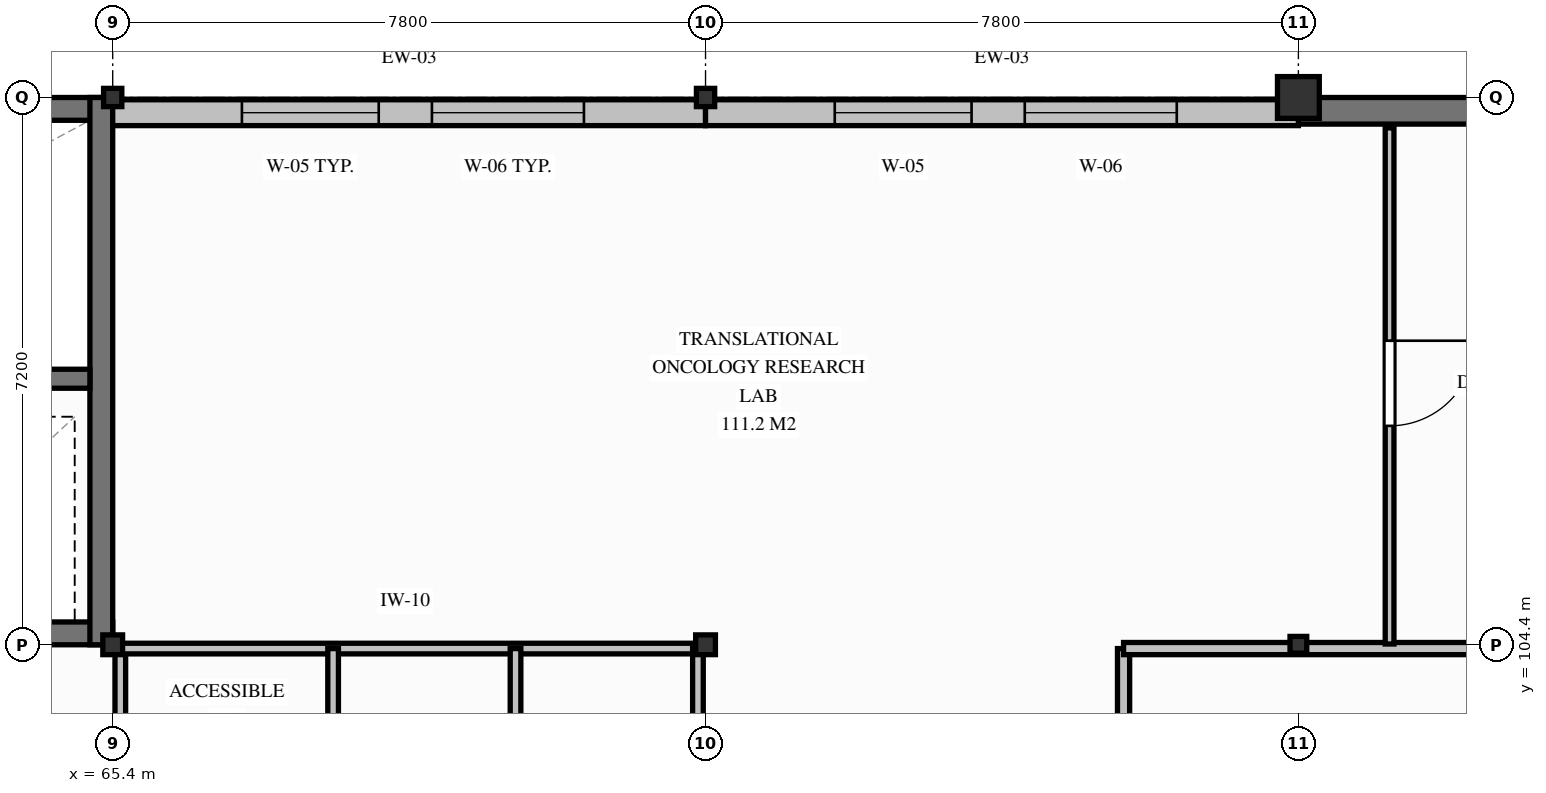
"""IFC4 building model, lengths in metres.
Left out: names, types, materials, properties, quantities, classifications, styles, units other than length and angle.
Written with IfcOpenShell. Run it as: python <this file> out.ifc"""

import sys

from ifc_helpers import new_model, si_unit, direction, frame, frame_2d, origin, origin_2d, place, context, subcontext, project, spatial, rectangle, hollow_rectangle, i_section, extrude, element, fill, save


model = new_model("IFC4")
c1 = context("Model", 3, precision=1e-05, world=origin(), true_north=direction((0.0, 1.0)))
c2 = subcontext(c1, "Body", "Model", "MODEL_VIEW")
j1 = project(units=[si_unit("LENGTHUNIT", "METRE"), si_unit("PLANEANGLEUNIT", "RADIAN")], contexts=[c1])
p1 = place(None, origin())
s1 = spatial("IfcSite", under=j1, at=p1, CompositionType="ELEMENT")
p2 = place(p1, origin())
s2 = spatial("IfcBuilding", under=s1, at=p2, CompositionType="ELEMENT")
p3 = place(p2, frame((0.0, 0.0, 25.35)))
s3 = spatial("IfcBuildingStorey", under=s2, at=p3, CompositionType="ELEMENT", Elevation=25.35)
p4 = place(p3, frame((57.0, 111.45, 0.0), z_axis=(0.0, 0.0, 1.0), x_axis=(1.0, 0.0, 0.0)))
e1 = element("IfcWall", 1, at=p4, inside=s3, PredefinedType="SHEAR", context=c2, shape_type="SweptSolid", body=[
    extrude(rectangle(XDim=8.4, YDim=0.3, at=frame_2d((4.2, 0.0))), origin(), (0.0, 0.0, 1.0), 4.05),
])
p5 = place(p3, frame((57.0, 104.55, 0.0), z_axis=(0.0, 0.0, 1.0), x_axis=(1.0, 0.0, 0.0)))
e2 = element("IfcWall", 2, at=p5, inside=s3, PredefinedType="SHEAR", context=c2, shape_type="SweptSolid", body=[
    extrude(rectangle(XDim=8.4, YDim=0.3, at=frame_2d((4.2, 0.0))), origin(), (0.0, 0.0, 1.0), 4.05),
])
p6 = place(p5, frame((0.55, 0.0, 0.0)))
e3 = element("IfcOpeningElement", 3, at=p6, cuts=e2, PredefinedType="OPENING", context=c2, shape_type="SweptSolid", body=[
    extrude(rectangle(XDim=1.1, YDim=2.15, at=frame_2d((0.55, 1.075))), frame((0.0, 0.16, 0.0), z_axis=(0.0, -1.0, 0.0), x_axis=(1.0, 0.0, 0.0)), (0.0, 0.0, 1.0), 0.32),
])
p7 = place(p5, frame((2.8, 0.0, 0.0)))
e4 = element("IfcOpeningElement", 4, at=p7, cuts=e2, PredefinedType="OPENING", context=c2, shape_type="SweptSolid", body=[
    extrude(rectangle(XDim=1.0, YDim=2.1, at=frame_2d((0.5, 1.05))), frame((0.0, 0.16, 0.0), z_axis=(0.0, -1.0, 0.0), x_axis=(1.0, 0.0, 0.0)), (0.0, 0.0, 1.0), 0.32),
])
p8 = place(p5, frame((5.85, 0.0, 0.0)))
e5 = element("IfcOpeningElement", 5, at=p8, cuts=e2, PredefinedType="OPENING", context=c2, shape_type="SweptSolid", body=[
    extrude(rectangle(XDim=1.2, YDim=2.15, at=frame_2d((0.6, 1.075))), frame((0.0, 0.16, 0.0), z_axis=(0.0, -1.0, 0.0), x_axis=(1.0, 0.0, 0.0)), (0.0, 0.0, 1.0), 0.32),
])
p9 = place(p3, frame((65.25, 104.4, 0.0), z_axis=(0.0, 0.0, 1.0), x_axis=(0.0, 1.0, 0.0)))
e6 = element("IfcWall", 6, at=p9, inside=s3, PredefinedType="SHEAR", context=c2, shape_type="SweptSolid", body=[
    extrude(rectangle(XDim=7.2, YDim=0.3, at=frame_2d((3.6, 0.0))), origin(), (0.0, 0.0, 1.0), 4.05),
])
p10 = place(p3, frame((57.3, 107.9, 0.0), z_axis=(0.0, 0.0, 1.0), x_axis=(1.0, 0.0, 0.0)))
e7 = element("IfcWall", 7, at=p10, inside=s3, PredefinedType="SHEAR", context=c2, shape_type="SweptSolid", body=[
    extrude(rectangle(XDim=7.8, YDim=0.25, at=frame_2d((3.9, 0.0))), origin(), (0.0, 0.0, 1.0), 4.05),
])
p11 = place(p10, frame((0.4, 0.0, 0.0)))
e8 = element("IfcOpeningElement", 8, at=p11, cuts=e7, PredefinedType="OPENING", context=c2, shape_type="SweptSolid", body=[
    extrude(rectangle(XDim=1.1, YDim=2.15, at=frame_2d((0.55, 1.075))), frame((0.0, 0.135, 0.0), z_axis=(0.0, -1.0, 0.0), x_axis=(1.0, 0.0, 0.0)), (0.0, 0.0, 1.0), 0.27),
])
p12 = place(p3, frame((81.0, 111.425, 0.0), z_axis=(0.0, 0.0, 1.0), x_axis=(1.0, 0.0, 0.0)))
e9 = element("IfcWall", 9, at=p12, inside=s3, PredefinedType="SHEAR", context=c2, shape_type="SweptSolid", body=[
    extrude(rectangle(XDim=7.8, YDim=0.35, at=frame_2d((3.9, 0.0))), origin(), (0.0, 0.0, 1.0), 4.05),
])
p13 = place(p3, frame((65.4, 104.4, 0.0), z_axis=(0.0, 0.0, 1.0), x_axis=(1.0, 0.0, 0.0)))
e10 = element("IfcColumn", 10, at=p13, inside=s3, PredefinedType="COLUMN", context=c2, shape_type="SweptSolid", body=[
    extrude(i_section(OverallWidth=0.26, OverallDepth=0.26, WebThickness=0.01, FlangeThickness=0.018, FilletRadius=0.024, at=origin_2d()), origin(), (0.0, 0.0, 1.0), 4.05),
])
p14 = place(p3, frame((65.4, 111.6, 0.0), z_axis=(0.0, 0.0, 1.0), x_axis=(1.0, 0.0, 0.0)))
e11 = element("IfcColumn", 11, at=p14, inside=s3, PredefinedType="COLUMN", context=c2, shape_type="SweptSolid", body=[
    extrude(i_section(OverallWidth=0.24, OverallDepth=0.24, WebThickness=0.01, FlangeThickness=0.017, FilletRadius=0.021, at=origin_2d()), origin(), (0.0, 0.0, 1.0), 4.05),
])
p15 = place(p3, frame((73.2, 104.4, 0.0), z_axis=(0.0, 0.0, 1.0), x_axis=(1.0, 0.0, 0.0)))
e12 = element("IfcColumn", 12, at=p15, inside=s3, PredefinedType="COLUMN", context=c2, shape_type="SweptSolid", body=[
    extrude(i_section(OverallWidth=0.26, OverallDepth=0.26, WebThickness=0.01, FlangeThickness=0.018, FilletRadius=0.024, at=origin_2d()), origin(), (0.0, 0.0, 1.0), 4.05),
])
p16 = place(p3, frame((73.2, 111.6, 0.0), z_axis=(0.0, 0.0, 1.0), x_axis=(1.0, 0.0, 0.0)))
e13 = element("IfcColumn", 13, at=p16, inside=s3, PredefinedType="COLUMN", context=c2, shape_type="SweptSolid", body=[
    extrude(i_section(OverallWidth=0.24, OverallDepth=0.24, WebThickness=0.01, FlangeThickness=0.017, FilletRadius=0.021, at=origin_2d()), origin(), (0.0, 0.0, 1.0), 4.05),
])
p17 = place(p3, frame((81.0, 104.4, 0.0), z_axis=(0.0, 0.0, 1.0), x_axis=(1.0, 0.0, 0.0)))
e14 = element("IfcColumn", 14, at=p17, inside=s3, PredefinedType="COLUMN", context=c2, shape_type="SweptSolid", body=[
    extrude(hollow_rectangle(XDim=0.22, YDim=0.22, WallThickness=0.012, InnerFilletRadius=0.019, OuterFilletRadius=0.031, at=origin_2d()), origin(), (0.0, 0.0, 1.0), 4.05),
])
p18 = place(p3, frame((81.0, 111.6, 0.0), z_axis=(0.0, 0.0, 1.0), x_axis=(1.0, 0.0, 0.0)))
e15 = element("IfcColumn", 15, at=p18, inside=s3, PredefinedType="COLUMN", context=c2, shape_type="SweptSolid", body=[
    extrude(rectangle(XDim=0.55, YDim=0.55, at=origin_2d()), origin(), (0.0, 0.0, 1.0), 4.05),
])
p19 = place(p3, frame((65.4, 111.4, 0.0), z_axis=(0.0, 0.0, 1.0), x_axis=(1.0, 0.0, 0.0)))
e16 = element("IfcWall", 16, at=p19, inside=s3, PredefinedType="SOLIDWALL", context=c2, shape_type="SweptSolid", body=[
    extrude(rectangle(XDim=7.8, YDim=0.34, at=frame_2d((3.9, 0.0))), origin(), (0.0, 0.0, 1.0), 3.238),
])
p20 = place(p19, frame((1.7, 0.0, 0.85)))
e17 = element("IfcOpeningElement", 17, at=p20, cuts=e16, PredefinedType="OPENING", context=c2, shape_type="SweptSolid", body=[
    extrude(rectangle(XDim=1.8, YDim=1.95, at=frame_2d((0.9, 0.975))), frame((0.0, 0.18, 0.0), z_axis=(0.0, -1.0, 0.0), x_axis=(1.0, 0.0, 0.0)), (0.0, 0.0, 1.0), 0.36),
])
p21 = place(p19, frame((4.2, 0.0, 0.85)))
e18 = element("IfcOpeningElement", 18, at=p21, cuts=e16, PredefinedType="OPENING", context=c2, shape_type="SweptSolid", body=[
    extrude(rectangle(XDim=2.0, YDim=1.95, at=frame_2d((1.0, 0.975))), frame((0.0, 0.18, 0.0), z_axis=(0.0, -1.0, 0.0), x_axis=(1.0, 0.0, 0.0)), (0.0, 0.0, 1.0), 0.36),
])
p22 = place(p3, frame((73.2, 111.4, 0.0), z_axis=(0.0, 0.0, 1.0), x_axis=(1.0, 0.0, 0.0)))
e19 = element("IfcWall", 19, at=p22, inside=s3, PredefinedType="SOLIDWALL", context=c2, shape_type="SweptSolid", body=[
    extrude(rectangle(XDim=7.8, YDim=0.34, at=frame_2d((3.9, 0.0))), origin(), (0.0, 0.0, 1.0), 3.188),
])
p23 = place(p22, frame((1.7, 0.0, 0.85)))
e20 = element("IfcOpeningElement", 20, at=p23, cuts=e19, PredefinedType="OPENING", context=c2, shape_type="SweptSolid", body=[
    extrude(rectangle(XDim=1.8, YDim=1.95, at=frame_2d((0.9, 0.975))), frame((0.0, 0.18, 0.0), z_axis=(0.0, -1.0, 0.0), x_axis=(1.0, 0.0, 0.0)), (0.0, 0.0, 1.0), 0.36),
])
p24 = place(p22, frame((4.2, 0.0, 0.85)))
e21 = element("IfcOpeningElement", 21, at=p24, cuts=e19, PredefinedType="OPENING", context=c2, shape_type="SweptSolid", body=[
    extrude(rectangle(XDim=2.0, YDim=1.95, at=frame_2d((1.0, 0.975))), frame((0.0, 0.18, 0.0), z_axis=(0.0, -1.0, 0.0), x_axis=(1.0, 0.0, 0.0)), (0.0, 0.0, 1.0), 0.36),
])
p25 = place(p3, frame((65.5, 100.7, 0.0), z_axis=(0.0, 0.0, 1.0), x_axis=(0.0, 1.0, 0.0)))
e22 = element("IfcWall", 22, at=p25, inside=s3, PredefinedType="PARTITIONING", context=c2, shape_type="SweptSolid", body=[
    extrude(rectangle(XDim=3.68, YDim=0.14, at=frame_2d((1.84, 0.0))), origin(), (0.0, 0.0, 1.0), 3.288),
])
p26 = place(p3, frame((65.4, 104.35, 0.0), z_axis=(0.0, 0.0, 1.0), x_axis=(1.0, 0.0, 0.0)))
e23 = element("IfcWall", 23, at=p26, inside=s3, PredefinedType="PARTITIONING", context=c2, shape_type="SweptSolid", body=[
    extrude(rectangle(XDim=7.7, YDim=0.14, at=frame_2d((3.85, 0.0))), origin(), (0.0, 0.0, 1.0), 3.238),
])
p27 = place(p3, frame((73.1, 100.7, 0.0), z_axis=(0.0, 0.0, 1.0), x_axis=(0.0, 1.0, 0.0)))
e24 = element("IfcWall", 24, at=p27, inside=s3, PredefinedType="PARTITIONING", context=c2, shape_type="SweptSolid", body=[
    extrude(rectangle(XDim=3.65, YDim=0.14, at=frame_2d((1.825, 0.0))), origin(), (0.0, 0.0, 1.0), 3.238),
])
for number, where, z_axis, x_axis in (
    (25, (68.3, 100.7, 0.0), (0.0, 0.0, 1.0), (0.0, 1.0, 0.0)),
    (26, (70.7, 100.7, 0.0), (0.0, 0.0, 1.0), (0.0, 1.0, 0.0)),
):
    element("IfcWall", number, at=place(p3, frame(where, z_axis=z_axis, x_axis=x_axis)), inside=s3, PredefinedType="PARTITIONING", context=c2, shape_type="SweptSolid", body=[
        extrude(rectangle(XDim=3.65, YDim=0.14, at=frame_2d((1.825, 0.0))), origin(), (0.0, 0.0, 1.0), 3.338),
    ])
p28 = place(p3, frame((78.7, 100.7, 0.0), z_axis=(0.0, 0.0, 1.0), x_axis=(0.0, 1.0, 0.0)))
e27 = element("IfcWall", 27, at=p28, inside=s3, PredefinedType="PARTITIONING", context=c2, shape_type="SweptSolid", body=[
    extrude(rectangle(XDim=3.65, YDim=0.16, at=frame_2d((1.825, 0.0))), origin(), (0.0, 0.0, 1.0), 3.388),
])
p29 = place(p3, frame((78.7, 104.35, 0.0), z_axis=(0.0, 0.0, 1.0), x_axis=(1.0, 0.0, 0.0)))
e28 = element("IfcWall", 28, at=p29, inside=s3, PredefinedType="PARTITIONING", context=c2, shape_type="SweptSolid", body=[
    extrude(rectangle(XDim=36.2, YDim=0.16, at=frame_2d((18.1, 0.0))), origin(), (0.0, 0.0, 1.0), 3.188),
])
p30 = place(p29, frame((16.23, 0.0, 0.0)))
e29 = element("IfcOpeningElement", 29, at=p30, cuts=e28, PredefinedType="OPENING", context=c2, shape_type="SweptSolid", body=[
    extrude(rectangle(XDim=1.24, YDim=2.2, at=frame_2d((0.62, 1.1))), frame((0.0, 0.09, 0.0), z_axis=(0.0, -1.0, 0.0), x_axis=(1.0, 0.0, 0.0)), (0.0, 0.0, 1.0), 0.18),
])
p31 = place(p3, frame((82.2, 111.2, 0.0), z_axis=(0.0, 0.0, 1.0), x_axis=(0.0, -1.0, 0.0)))
e30 = element("IfcWall", 30, at=p31, inside=s3, PredefinedType="PARTITIONING", context=c2, shape_type="SweptSolid", body=[
    extrude(rectangle(XDim=6.79, YDim=0.115, at=frame_2d((3.395, 0.0))), origin(), (0.0, 0.0, 1.0), 3.348),
])
p32 = place(p31, frame((2.8, 0.0, 0.0)))
e31 = element("IfcOpeningElement", 31, at=p32, cuts=e30, PredefinedType="OPENING", context=c2, shape_type="SweptSolid", body=[
    extrude(rectangle(XDim=1.12, YDim=2.18, at=frame_2d((0.56, 1.09))), frame((0.0, 0.067, 0.0), z_axis=(0.0, -1.0, 0.0), x_axis=(1.0, 0.0, 0.0)), (0.0, 0.0, 1.0), 0.135),
])
p33 = place(p20, origin())
e32 = element("IfcWindow", 32, at=p33, inside=s3, PartitioningType="SINGLE_PANEL", PredefinedType="WINDOW", context=c2, shape_type="SweptSolid", body=[
    extrude(rectangle(XDim=1.8, YDim=1.95, at=frame_2d((0.9, 0.975))), frame((0.0, 0.03, 0.0), z_axis=(0.0, -1.0, 0.0), x_axis=(1.0, 0.0, 0.0)), (0.0, 0.0, 1.0), 0.06),
])
fill(e17, e32)
p34 = place(p21, origin())
e33 = element("IfcWindow", 33, at=p34, inside=s3, PartitioningType="SINGLE_PANEL", PredefinedType="WINDOW", context=c2, shape_type="SweptSolid", body=[
    extrude(rectangle(XDim=2.0, YDim=1.95, at=frame_2d((1.0, 0.975))), frame((0.0, 0.03, 0.0), z_axis=(0.0, -1.0, 0.0), x_axis=(1.0, 0.0, 0.0)), (0.0, 0.0, 1.0), 0.06),
])
fill(e18, e33)
p35 = place(p23, origin())
e34 = element("IfcWindow", 34, at=p35, inside=s3, PartitioningType="SINGLE_PANEL", PredefinedType="WINDOW", context=c2, shape_type="SweptSolid", body=[
    extrude(rectangle(XDim=1.8, YDim=1.95, at=frame_2d((0.9, 0.975))), frame((0.0, 0.03, 0.0), z_axis=(0.0, -1.0, 0.0), x_axis=(1.0, 0.0, 0.0)), (0.0, 0.0, 1.0), 0.06),
])
fill(e20, e34)
p36 = place(p24, origin())
e35 = element("IfcWindow", 35, at=p36, inside=s3, PartitioningType="SINGLE_PANEL", PredefinedType="WINDOW", context=c2, shape_type="SweptSolid", body=[
    extrude(rectangle(XDim=2.0, YDim=1.95, at=frame_2d((1.0, 0.975))), frame((0.0, 0.03, 0.0), z_axis=(0.0, -1.0, 0.0), x_axis=(1.0, 0.0, 0.0)), (0.0, 0.0, 1.0), 0.06),
])
fill(e21, e35)
p37 = place(p32, origin())
e36 = element("IfcDoor", 36, at=p37, inside=s3, OperationType="SINGLE_SWING_LEFT", PredefinedType="DOOR", context=c2, shape_type="SweptSolid", body=[
    extrude(rectangle(XDim=1.12, YDim=2.18, at=frame_2d((0.56, 1.09))), frame((0.0, 0.025, 0.0), z_axis=(0.0, -1.0, 0.0), x_axis=(1.0, 0.0, 0.0)), (0.0, 0.0, 1.0), 0.05),
])
fill(e31, e36)
save(model, sys.argv[1])
